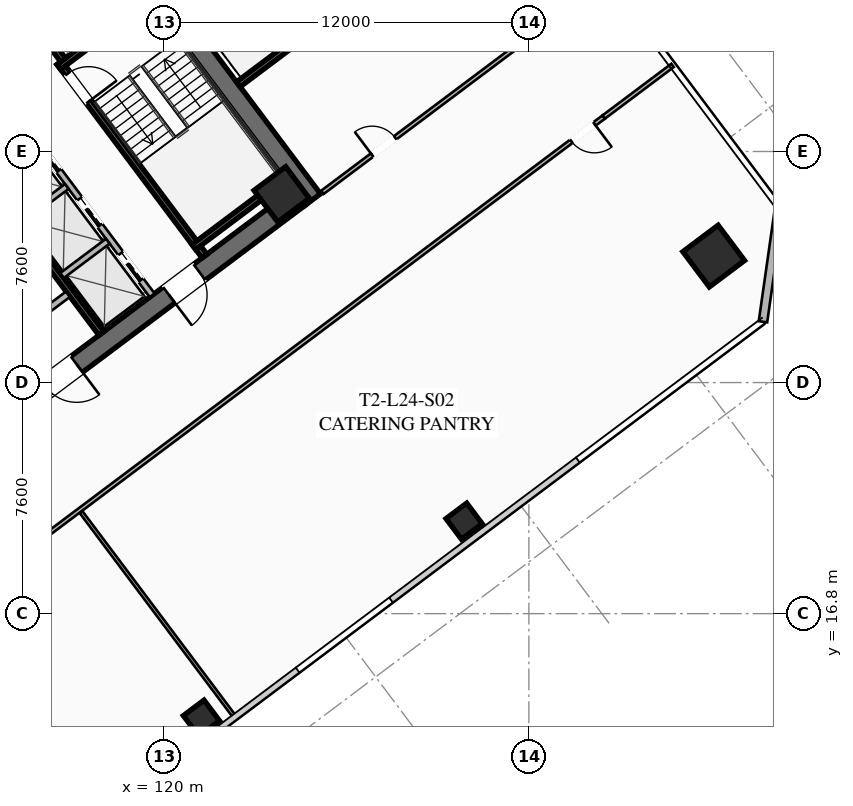
"""IFC4 building model, lengths in metres.
Left out: names, types, materials, properties, quantities, classifications, styles, units other than length and angle.
Written with IfcOpenShell. Run it as: python <this file> out.ifc"""

import sys

from ifc_helpers import new_model, si_unit, direction, frame, frame_2d, origin, origin_2d, place, context, subcontext, project, spatial, rectangle, hollow_rectangle, extrude, element, fill, save


model = new_model("IFC4")
c1 = context("Model", 3, precision=1e-05, world=origin(), true_north=direction((0.0, 1.0)))
c2 = subcontext(c1, "Body", "Model", "MODEL_VIEW")
j1 = project(units=[si_unit("LENGTHUNIT", "METRE"), si_unit("PLANEANGLEUNIT", "RADIAN")], contexts=[c1])
p1 = place(None, origin())
s1 = spatial("IfcSite", under=j1, at=p1, CompositionType="ELEMENT")
p2 = place(p1, origin())
s2 = spatial("IfcBuilding", under=s1, at=p2, CompositionType="ELEMENT")
p3 = place(p2, frame((0.0, 0.0, 92.05)))
s3 = spatial("IfcBuildingStorey", under=s2, at=p3, CompositionType="ELEMENT", Elevation=92.05)
p4 = place(p3, frame((115.524, 42.893, 0.0), z_axis=(0.0, 0.0, 1.0), x_axis=(0.600005007985, -0.799996243986, 0.0)))
e1 = element("IfcWall", 1, at=p4, inside=s3, PredefinedType="SHEAR", context=c2, shape_type="SweptSolid", body=[
    extrude(rectangle(XDim=15.6, YDim=0.65, at=frame_2d((7.8, 0.0))), origin(), (0.0, 0.0, 1.0), 3.55),
])
p5 = place(p3, frame((124.429, 30.478, 0.0), z_axis=(0.0, 0.0, 1.0), x_axis=(-0.799998028465, -0.600002628705, 0.0)))
e2 = element("IfcWall", 2, at=p5, inside=s3, PredefinedType="SHEAR", context=c2, shape_type="SweptSolid", body=[
    extrude(rectangle(XDim=14.86, YDim=0.65, at=frame_2d((7.43, 0.0))), origin(), (0.0, 0.0, 1.0), 3.55),
])
p6 = place(p5, frame((9.13, 0.0, 0.0)))
e3 = element("IfcOpeningElement", 3, at=p6, cuts=e2, PredefinedType="OPENING", context=c2, shape_type="SweptSolid", body=[
    extrude(rectangle(XDim=1.25, YDim=2.25, at=frame_2d((0.625, 1.125))), frame((0.0, 0.335, 0.0), z_axis=(0.0, -1.0, 0.0), x_axis=(1.0, 0.0, 0.0)), (0.0, 0.0, 1.0), 0.67),
])
p7 = place(p5, frame((4.08, 0.0, 0.0)))
e4 = element("IfcOpeningElement", 4, at=p7, cuts=e2, PredefinedType="OPENING", context=c2, shape_type="SweptSolid", body=[
    extrude(rectangle(XDim=1.25, YDim=2.25, at=frame_2d((0.625, 1.125))), frame((0.0, 0.335, 0.0), z_axis=(0.0, -1.0, 0.0), x_axis=(1.0, 0.0, 0.0)), (0.0, 0.0, 1.0), 0.67),
])
p8 = place(p3, frame((123.87, 30.59, 0.0), z_axis=(0.0, 0.0, 1.0), x_axis=(0.799999996291, 0.600000004945, 0.0)))
e5 = element("IfcColumn", 5, at=p8, inside=s3, PredefinedType="COLUMN", context=c2, shape_type="SweptSolid", body=[
    extrude(hollow_rectangle(XDim=1.3, YDim=1.3, WallThickness=0.05, at=origin_2d()), origin(), (0.0, 0.0, 1.0), 3.35),
])
p9 = place(p3, frame((138.08, 28.56, 0.0), z_axis=(0.0, 0.0, 1.0), x_axis=(0.799999996291, 0.600000004945, 0.0)))
e6 = element("IfcColumn", 6, at=p9, inside=s3, PredefinedType="COLUMN", context=c2, shape_type="SweptSolid", body=[
    extrude(hollow_rectangle(XDim=1.45, YDim=1.45, WallThickness=0.055, at=origin_2d()), origin(), (0.0, 0.0, 1.0), 3.35),
])
for number, where, z_axis, x_axis in (
    (7, (121.23, 13.36, 0.0), (0.0, 0.0, 1.0), (0.8, 0.6, 0.0)),
    (8, (129.87, 19.84, 0.0), (0.0, 0.0, 1.0), (0.8, 0.6, 0.0)),
):
    element("IfcColumn", number, at=place(p3, frame(where, z_axis=z_axis, x_axis=x_axis)), inside=s3, PredefinedType="COLUMN", context=c2, shape_type="SweptSolid", body=[
        extrude(hollow_rectangle(XDim=0.85, YDim=0.85, WallThickness=0.035, at=origin_2d()), origin(), (0.0, 0.0, 1.0), 3.35),
    ])
p10 = place(p3, frame((140.24, 30.18, 0.0), z_axis=(0.0, 0.0, 1.0), x_axis=(-0.141430307517, -0.989948214866, 0.0)))
e9 = element("IfcWall", 9, at=p10, inside=s3, PredefinedType="SOLIDWALL", context=c2, shape_type="SweptSolid", body=[
    extrude(rectangle(XDim=3.818, YDim=0.28, at=frame_2d((1.909, 0.0))), origin(), (0.0, 0.0, 1.0), 3.35),
])
p11 = place(p3, frame((116.56, 34.92, 0.0), z_axis=(0.0, 0.0, 1.0), x_axis=(0.600009827119, -0.799992629566, 0.0)))
e10 = element("IfcWall", 10, at=p11, inside=s3, PredefinedType="SHEAR", context=c2, shape_type="SweptSolid", body=[
    extrude(rectangle(XDim=7.95, YDim=0.2, at=frame_2d((3.975, 0.0))), origin(), (0.0, 0.0, 1.0), 3.35),
])
p12 = place(p11, frame((0.45, 0.0, 0.0)))
e11 = element("IfcOpeningElement", 11, at=p12, cuts=e10, PredefinedType="OPENING", context=c2, shape_type="SweptSolid", body=[
    extrude(rectangle(XDim=1.15, YDim=2.2, at=frame_2d((0.575, 1.1))), frame((0.0, 0.11, 0.0), z_axis=(0.0, -1.0, 0.0), x_axis=(1.0, 0.0, 0.0)), (0.0, 0.0, 1.0), 0.22),
])
for number, where, z_axis, x_axis in (
    (12, (116.54, 34.78, 0.0), (0.0, 0.0, 1.0), (0.8, 0.6, 0.0)),
    (13, (120.98, 28.86, 0.0), (0.0, 0.0, 1.0), (0.8, 0.6, 0.0)),
):
    element("IfcWall", number, at=place(p3, frame(where, z_axis=z_axis, x_axis=x_axis)), inside=s3, PredefinedType="SHEAR", context=c2, shape_type="SweptSolid", body=[
        extrude(rectangle(XDim=3.73, YDim=0.2, at=frame_2d((1.865, 0.0))), origin(), (0.0, 0.0, 1.0), 3.35),
    ])
p13 = place(p3, frame((117.938, 26.016, 0.0), z_axis=(0.0, 0.0, 1.0), x_axis=(-0.600005463273, 0.799995902516, 0.0)))
e14 = element("IfcWall", 14, at=p13, inside=s3, PredefinedType="SHEAR", context=c2, shape_type="SweptSolid", body=[
    extrude(rectangle(XDim=14.3, YDim=0.2, at=frame_2d((7.15, 0.0))), origin(), (0.0, 0.0, 1.0), 3.35),
])
p14 = place(p3, frame((114.316, 25.412, 0.0), z_axis=(0.0, 0.0, 1.0), x_axis=(0.800018601094, 0.59997519774, 0.0)))
e15 = element("IfcWall", 15, at=p14, inside=s3, PredefinedType="SOLIDWALL", context=c2, shape_type="SweptSolid", body=[
    extrude(rectangle(XDim=3.15, YDim=0.22, at=frame_2d((1.575, 0.0))), origin(), (0.0, 0.0, 1.0), 2.703),
])
p15 = place(p14, frame((0.95, 0.0, 0.0)))
e16 = element("IfcOpeningElement", 16, at=p15, cuts=e15, PredefinedType="OPENING", context=c2, shape_type="SweptSolid", body=[
    extrude(rectangle(XDim=1.25, YDim=2.25, at=frame_2d((0.625, 1.125))), frame((0.0, 0.12, 0.0), z_axis=(0.0, -1.0, 0.0), x_axis=(1.0, 0.0, 0.0)), (0.0, 0.0, 1.0), 0.24),
])
p16 = place(p3, frame((112.87, 40.09, 0.0), z_axis=(0.0, 0.0, 1.0), x_axis=(0.599975393228, -0.800018454488, 0.0)))
e17 = element("IfcWall", 17, at=p16, inside=s3, PredefinedType="SHEAR", context=c2, shape_type="SweptSolid", body=[
    extrude(rectangle(XDim=6.35, YDim=0.2, at=frame_2d((3.175, 0.0))), origin(), (0.0, 0.0, 1.0), 3.35),
])
p17 = place(p3, frame((119.61, 27.27, 0.0), z_axis=(0.0, 0.0, 1.0), x_axis=(-0.600011488909, 0.79999138319, 0.0)))
e18 = element("IfcWall", 18, at=p17, inside=s3, PredefinedType="SOLIDWALL", context=c2, shape_type="SweptSolid", body=[
    extrude(rectangle(XDim=6.8, YDim=0.2, at=frame_2d((3.4, 0.0))), origin(), (0.0, 0.0, 1.0), 3.35),
])
p18 = place(p17, frame((0.625, 0.0, 0.0)))
e19 = element("IfcOpeningElement", 19, at=p18, cuts=e18, PredefinedType="OPENING", context=c2, shape_type="SweptSolid", body=[
    extrude(rectangle(XDim=1.1, YDim=2.2, at=frame_2d((0.55, 1.1))), frame((0.0, 0.11, 0.0), z_axis=(0.0, -1.0, 0.0), x_axis=(1.0, 0.0, 0.0)), (0.0, 0.0, 1.0), 0.22),
])
p19 = place(p17, frame((2.875, 0.0, 0.0)))
e20 = element("IfcOpeningElement", 20, at=p19, cuts=e18, PredefinedType="OPENING", context=c2, shape_type="SweptSolid", body=[
    extrude(rectangle(XDim=1.1, YDim=2.2, at=frame_2d((0.55, 1.1))), frame((0.0, 0.11, 0.0), z_axis=(0.0, -1.0, 0.0), x_axis=(1.0, 0.0, 0.0)), (0.0, 0.0, 1.0), 0.22),
])
p20 = place(p17, frame((5.125, 0.0, 0.0)))
e21 = element("IfcOpeningElement", 21, at=p20, cuts=e18, PredefinedType="OPENING", context=c2, shape_type="SweptSolid", body=[
    extrude(rectangle(XDim=1.1, YDim=2.2, at=frame_2d((0.55, 1.1))), frame((0.0, 0.11, 0.0), z_axis=(0.0, -1.0, 0.0), x_axis=(1.0, 0.0, 0.0)), (0.0, 0.0, 1.0), 0.22),
])
p21 = place(p3, frame((116.646, 27.922, 0.0), z_axis=(0.0, 0.0, 1.0), x_axis=(0.8, 0.6, 0.0)))
e22 = element("IfcWall", 22, at=p21, inside=s3, PredefinedType="SOLIDWALL", context=c2, shape_type="SweptSolid", body=[
    extrude(rectangle(XDim=1.88, YDim=0.2, at=frame_2d((0.94, 0.0))), origin(), (0.0, 0.0, 1.0), 3.35),
])
p22 = place(p3, frame((115.296, 29.722, 0.0), z_axis=(0.0, 0.0, 1.0), x_axis=(0.799984418148, 0.600020775241, 0.0)))
e23 = element("IfcWall", 23, at=p22, inside=s3, PredefinedType="SOLIDWALL", context=c2, shape_type="SweptSolid", body=[
    extrude(rectangle(XDim=1.88, YDim=0.2, at=frame_2d((0.94, 0.0))), origin(), (0.0, 0.0, 1.0), 3.35),
])
p23 = place(p3, frame((122.444, 34.208, 0.0), z_axis=(0.0, 0.0, 1.0), x_axis=(0.79999138319, 0.600011488909, 0.0)))
e24 = element("IfcWall", 24, at=p23, inside=s3, PredefinedType="SHEAR", context=c2, shape_type="SweptSolid", body=[
    extrude(rectangle(XDim=3.4, YDim=0.2, at=frame_2d((1.7, 0.0))), origin(), (0.0, 0.0, 1.0), 3.35),
])
p24 = place(p3, frame((98.316, 33.862, 0.0), z_axis=(0.0, 0.0, 1.0), x_axis=(0.8000041147, 0.599994513695, 0.0)))
e25 = element("IfcWall", 25, at=p24, inside=s3, PredefinedType="PARTITIONING", context=c2, shape_type="SweptSolid", body=[
    extrude(rectangle(XDim=28.48, YDim=0.135, at=frame_2d((14.24, 0.0))), origin(), (0.0, 0.0, 1.0), 2.703),
])
p25 = place(p24, frame((0.3, 0.0, 0.0)))
e26 = element("IfcOpeningElement", 26, at=p25, cuts=e25, PredefinedType="OPENING", context=c2, shape_type="SweptSolid", body=[
    extrude(rectangle(XDim=0.95, YDim=2.05, at=frame_2d((0.475, 1.025))), frame((0.0, 0.077, 0.0), z_axis=(0.0, -1.0, 0.0), x_axis=(1.0, 0.0, 0.0)), (0.0, 0.0, 1.0), 0.155),
])
p26 = place(p24, frame((7.195, 0.0, 0.0)))
e27 = element("IfcOpeningElement", 27, at=p26, cuts=e25, PredefinedType="OPENING", context=c2, shape_type="SweptSolid", body=[
    extrude(rectangle(XDim=0.95, YDim=2.05, at=frame_2d((0.475, 1.025))), frame((0.0, 0.077, 0.0), z_axis=(0.0, -1.0, 0.0), x_axis=(1.0, 0.0, 0.0)), (0.0, 0.0, 1.0), 0.155),
])
p27 = place(p24, frame((11.222, 0.0, 0.0)))
e28 = element("IfcOpeningElement", 28, at=p27, cuts=e25, PredefinedType="OPENING", context=c2, shape_type="SweptSolid", body=[
    extrude(rectangle(XDim=0.95, YDim=2.05, at=frame_2d((0.475, 1.025))), frame((0.0, 0.077, 0.0), z_axis=(0.0, -1.0, 0.0), x_axis=(1.0, 0.0, 0.0)), (0.0, 0.0, 1.0), 0.155),
])
p28 = place(p24, frame((27.23, 0.0, 0.0)))
e29 = element("IfcOpeningElement", 29, at=p28, cuts=e25, PredefinedType="OPENING", context=c2, shape_type="SweptSolid", body=[
    extrude(rectangle(XDim=0.95, YDim=2.05, at=frame_2d((0.475, 1.025))), frame((0.0, 0.077, 0.0), z_axis=(0.0, -1.0, 0.0), x_axis=(1.0, 0.0, 0.0)), (0.0, 0.0, 1.0), 0.155),
])
p29 = place(p3, frame((134.462, 33.134, 0.0), z_axis=(0.0, 0.0, 1.0), x_axis=(-0.799996913945, -0.600004114717, 0.0)))
e30 = element("IfcWall", 30, at=p29, inside=s3, PredefinedType="PARTITIONING", context=c2, shape_type="SweptSolid", body=[
    extrude(rectangle(XDim=28.48, YDim=0.135, at=frame_2d((14.24, 0.0))), origin(), (0.0, 0.0, 1.0), 2.703),
])
p30 = place(p29, frame((27.15, 0.0, 0.0)))
e31 = element("IfcOpeningElement", 31, at=p30, cuts=e30, PredefinedType="OPENING", context=c2, shape_type="SweptSolid", body=[
    extrude(rectangle(XDim=0.95, YDim=2.05, at=frame_2d((0.475, 1.025))), frame((0.0, 0.077, 0.0), z_axis=(0.0, -1.0, 0.0), x_axis=(1.0, 0.0, 0.0)), (0.0, 0.0, 1.0), 0.155),
])
p31 = place(p29, frame((0.38, 0.0, 0.0)))
e32 = element("IfcOpeningElement", 32, at=p31, cuts=e30, PredefinedType="OPENING", context=c2, shape_type="SweptSolid", body=[
    extrude(rectangle(XDim=0.95, YDim=2.05, at=frame_2d((0.475, 1.025))), frame((0.0, 0.077, 0.0), z_axis=(0.0, -1.0, 0.0), x_axis=(1.0, 0.0, 0.0)), (0.0, 0.0, 1.0), 0.155),
])
p32 = place(p3, frame((134.462, 33.134, 0.0), z_axis=(0.0, 0.0, 1.0), x_axis=(0.8000207031, 0.599972394874, 0.0)))
e33 = element("IfcWall", 33, at=p32, inside=s3, PredefinedType="PARTITIONING", context=c2, shape_type="SweptSolid", body=[
    extrude(rectangle(XDim=2.83, YDim=0.135, at=frame_2d((1.415, 0.0))), origin(), (0.0, 0.0, 1.0), 2.703),
])
p33 = place(p3, frame((122.328, 13.396, 0.0), z_axis=(0.0, 0.0, 1.0), x_axis=(-0.59999536615, 0.800003475366, 0.0)))
e34 = element("IfcWall", 34, at=p33, inside=s3, PredefinedType="PARTITIONING", context=c2, shape_type="SweptSolid", body=[
    extrude(rectangle(XDim=8.43, YDim=0.11, at=frame_2d((4.215, 0.0))), origin(), (0.0, 0.0, 1.0), 2.703),
])
p34 = place(p3, frame((125.208, 30.656, 0.0), z_axis=(0.0, 0.0, 1.0), x_axis=(0.8, 0.6, 0.0)))
e35 = element("IfcWall", 35, at=p34, inside=s3, PredefinedType="PARTITIONING", context=c2, shape_type="SweptSolid", body=[
    extrude(rectangle(XDim=11.72, YDim=0.135, at=frame_2d((5.86, 0.0))), origin(), (0.0, 0.0, 1.0), 2.703),
])
p35 = place(p34, frame((2.045, 0.0, 0.0)))
e36 = element("IfcOpeningElement", 36, at=p35, cuts=e35, PredefinedType="OPENING", context=c2, shape_type="SweptSolid", body=[
    extrude(rectangle(XDim=0.95, YDim=2.05, at=frame_2d((0.475, 1.025))), frame((0.0, 0.077, 0.0), z_axis=(0.0, -1.0, 0.0), x_axis=(1.0, 0.0, 0.0)), (0.0, 0.0, 1.0), 0.155),
])
p36 = place(p6, origin())
e37 = element("IfcDoor", 37, at=p36, inside=s3, OperationType="SINGLE_SWING_LEFT", PredefinedType="DOOR", context=c2, shape_type="SweptSolid", body=[
    extrude(rectangle(XDim=1.25, YDim=2.25, at=frame_2d((0.625, 1.125))), frame((0.0, 0.025, 0.0), z_axis=(0.0, -1.0, 0.0), x_axis=(1.0, 0.0, 0.0)), (0.0, 0.0, 1.0), 0.05),
])
fill(e3, e37)
p37 = place(p7, origin())
e38 = element("IfcDoor", 38, at=p37, inside=s3, OperationType="SINGLE_SWING_RIGHT", PredefinedType="DOOR", context=c2, shape_type="SweptSolid", body=[
    extrude(rectangle(XDim=1.25, YDim=2.25, at=frame_2d((0.625, 1.125))), frame((0.0, 0.025, 0.0), z_axis=(0.0, -1.0, 0.0), x_axis=(1.0, 0.0, 0.0)), (0.0, 0.0, 1.0), 0.05),
])
fill(e4, e38)
p38 = place(p12, origin())
e39 = element("IfcDoor", 39, at=p38, inside=s3, OperationType="SINGLE_SWING_RIGHT", PredefinedType="DOOR", context=c2, shape_type="SweptSolid", body=[
    extrude(rectangle(XDim=1.15, YDim=2.2, at=frame_2d((0.575, 1.1))), frame((0.0, 0.025, 0.0), z_axis=(0.0, -1.0, 0.0), x_axis=(1.0, 0.0, 0.0)), (0.0, 0.0, 1.0), 0.05),
])
fill(e11, e39)
p39 = place(p31, origin())
e40 = element("IfcDoor", 40, at=p39, inside=s3, OperationType="SINGLE_SWING_LEFT", PredefinedType="DOOR", context=c2, shape_type="SweptSolid", body=[
    extrude(rectangle(XDim=0.95, YDim=2.05, at=frame_2d((0.475, 1.025))), frame((0.0, 0.025, 0.0), z_axis=(0.0, -1.0, 0.0), x_axis=(1.0, 0.0, 0.0)), (0.0, 0.0, 1.0), 0.05),
])
fill(e32, e40)
p40 = place(p35, origin())
e41 = element("IfcDoor", 41, at=p40, inside=s3, OperationType="SINGLE_SWING_LEFT", PredefinedType="DOOR", context=c2, shape_type="SweptSolid", body=[
    extrude(rectangle(XDim=0.95, YDim=2.05, at=frame_2d((0.475, 1.025))), frame((0.0, 0.025, 0.0), z_axis=(0.0, -1.0, 0.0), x_axis=(1.0, 0.0, 0.0)), (0.0, 0.0, 1.0), 0.05),
])
fill(e36, e41)
p41 = place(p18, origin())
e42 = element("IfcDoor", 42, at=p41, inside=s3, OperationType="SLIDING_TO_LEFT", PredefinedType="DOOR", context=c2, shape_type="SweptSolid", body=[
    extrude(rectangle(XDim=1.1, YDim=2.2, at=frame_2d((0.55, 1.1))), frame((0.0, 0.025, 0.0), z_axis=(0.0, -1.0, 0.0), x_axis=(1.0, 0.0, 0.0)), (0.0, 0.0, 1.0), 0.05),
])
fill(e19, e42)
p42 = place(p19, origin())
e43 = element("IfcDoor", 43, at=p42, inside=s3, OperationType="SLIDING_TO_LEFT", PredefinedType="DOOR", context=c2, shape_type="SweptSolid", body=[
    extrude(rectangle(XDim=1.1, YDim=2.2, at=frame_2d((0.55, 1.1))), frame((0.0, 0.025, 0.0), z_axis=(0.0, -1.0, 0.0), x_axis=(1.0, 0.0, 0.0)), (0.0, 0.0, 1.0), 0.05),
])
fill(e20, e43)
p43 = place(p20, origin())
e44 = element("IfcDoor", 44, at=p43, inside=s3, OperationType="SLIDING_TO_LEFT", PredefinedType="DOOR", context=c2, shape_type="SweptSolid", body=[
    extrude(rectangle(XDim=1.1, YDim=2.2, at=frame_2d((0.55, 1.1))), frame((0.0, 0.025, 0.0), z_axis=(0.0, -1.0, 0.0), x_axis=(1.0, 0.0, 0.0)), (0.0, 0.0, 1.0), 0.05),
])
fill(e21, e44)
save(model, sys.argv[1])
